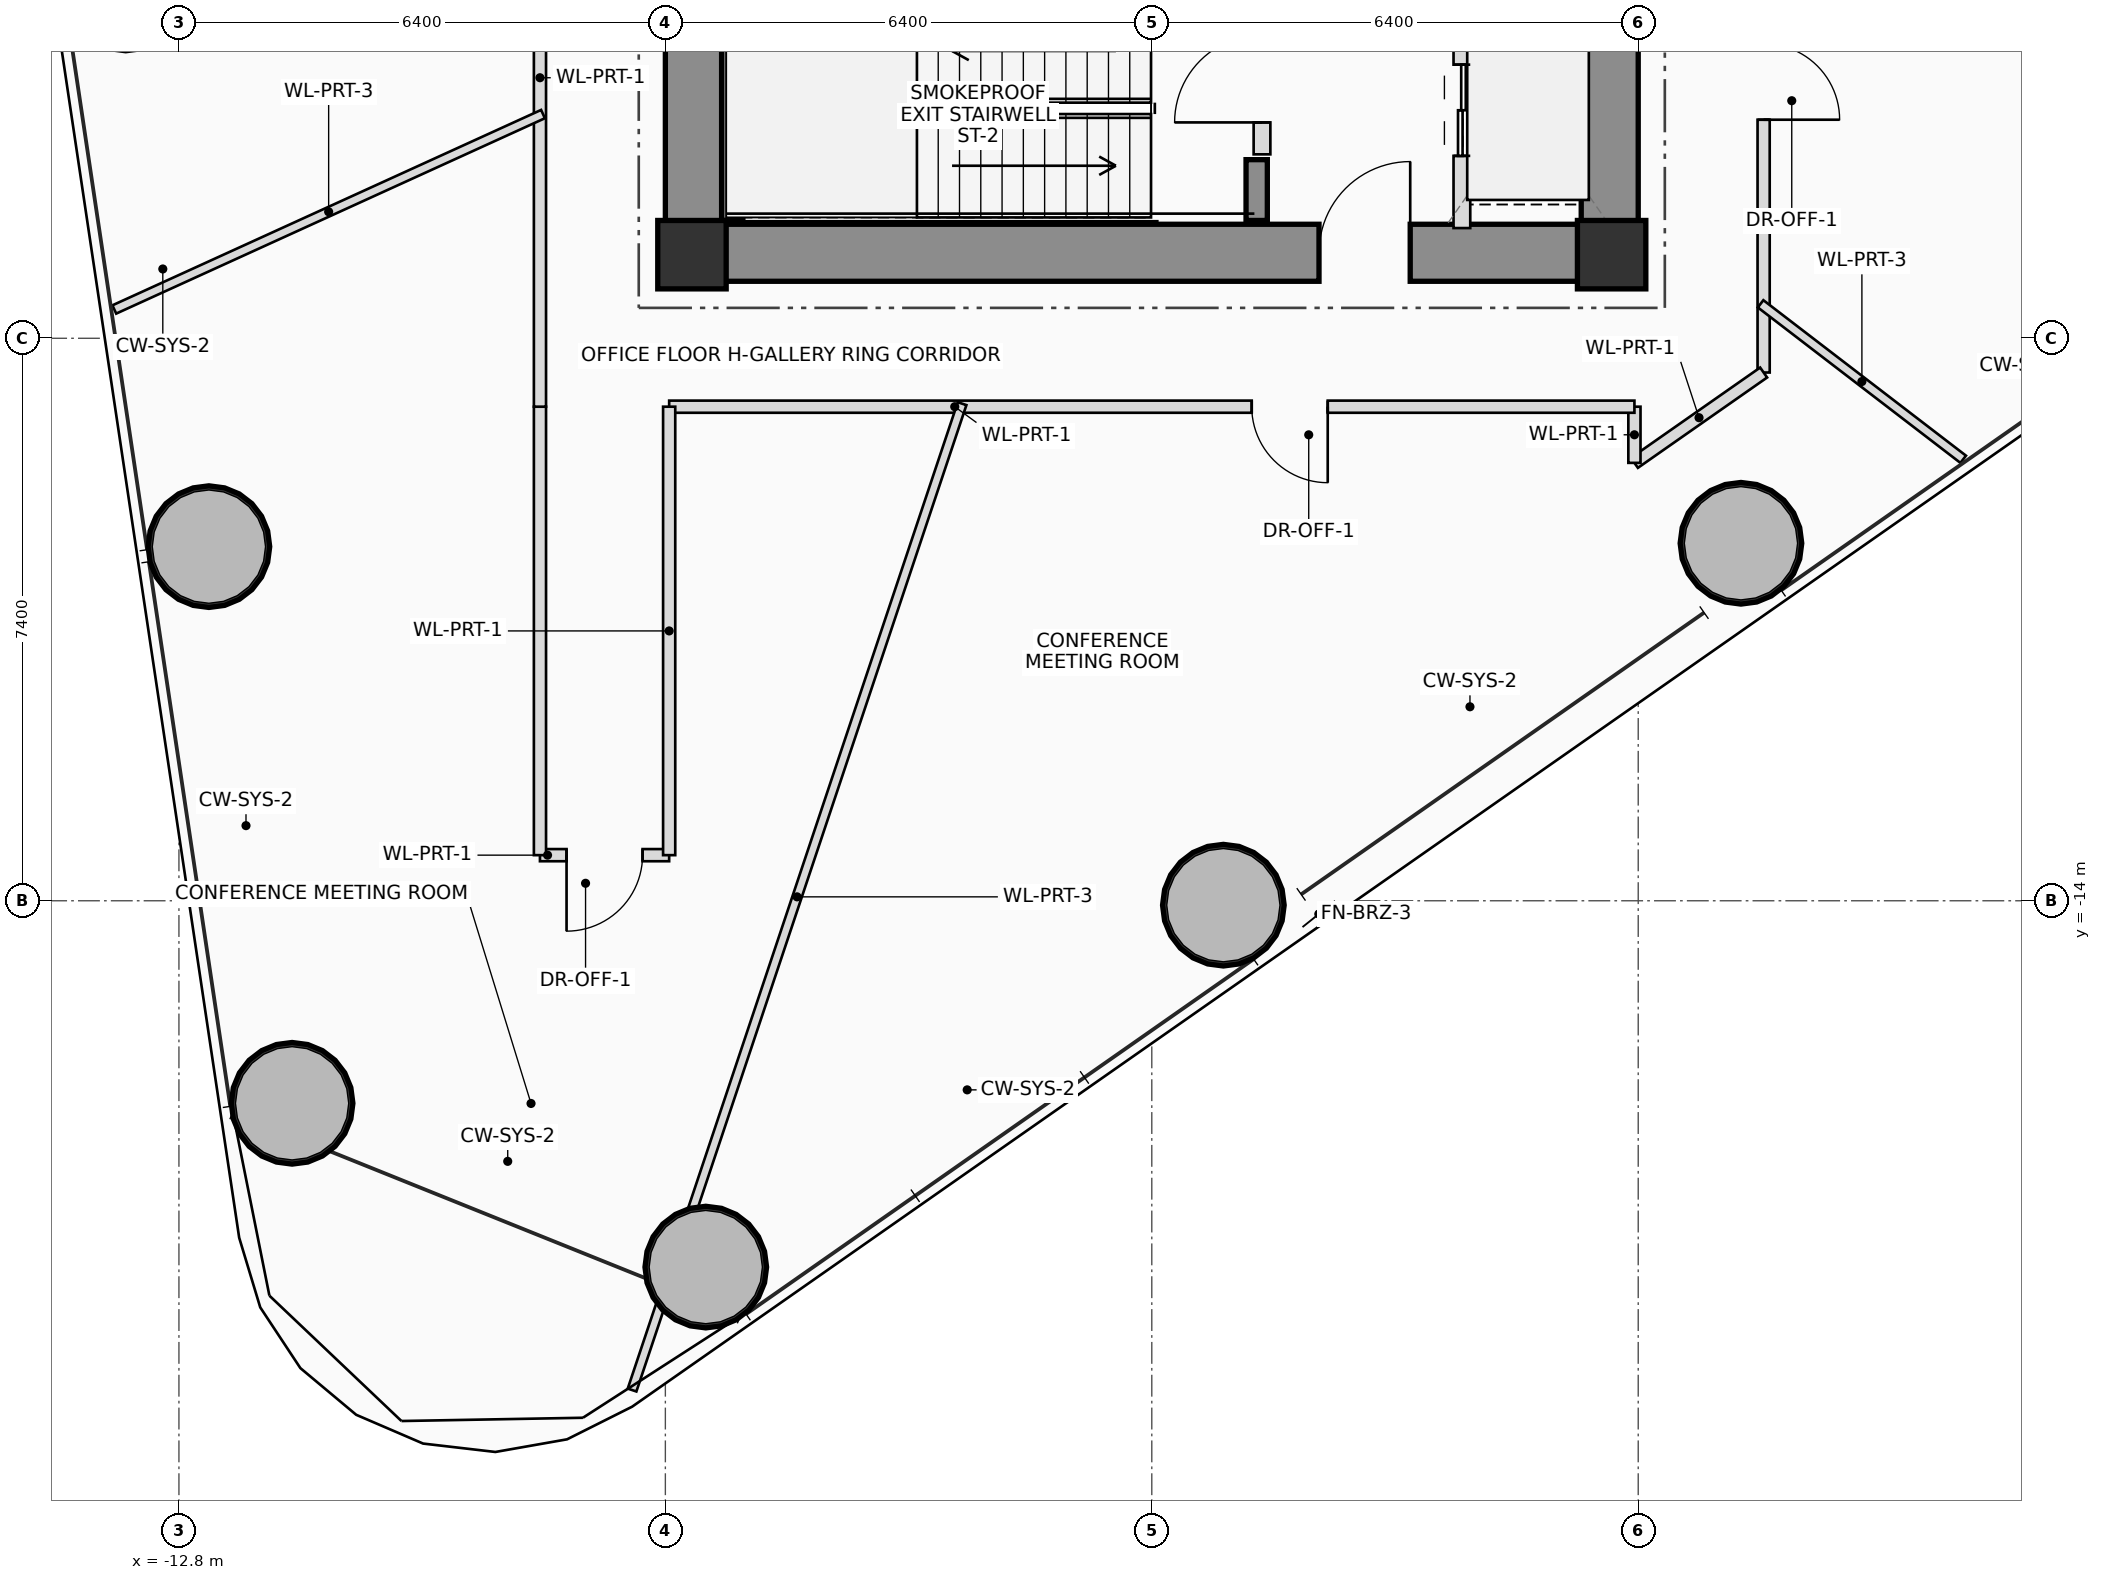
"""IFC4 building model, lengths in metres.
Left out: names, types, materials, properties, quantities, classifications, styles, units other than length and angle.
Written with IfcOpenShell. Run it as: python <this file> out.ifc"""

import sys

from ifc_helpers import new_model, si_unit, direction, frame, frame_2d, origin, origin_2d, place, context, subcontext, project, spatial, rectangle, hollow_circle, extrude, source, transform, mapped, element, fill, save


model = new_model("IFC4")
c1 = context("Model", 3, precision=1e-05, world=origin(), true_north=direction((0.0, 1.0)))
c2 = subcontext(c1, "Body", "Model", "MODEL_VIEW")
j1 = project(units=[si_unit("LENGTHUNIT", "METRE"), si_unit("PLANEANGLEUNIT", "RADIAN")], contexts=[c1])
p1 = place(None, origin())
s1 = spatial("IfcSite", under=j1, at=p1, CompositionType="ELEMENT")
p2 = place(p1, origin())
s2 = spatial("IfcBuilding", under=s1, at=p2, CompositionType="ELEMENT")
p3 = place(p2, frame((0.0, 0.0, 54.8)))
s3 = spatial("IfcBuildingStorey", under=s2, at=p3, CompositionType="ELEMENT", Elevation=54.8)
m1 = source(origin(), c2, "Body", "SweptSolid", [
    extrude(rectangle(XDim=0.9, YDim=0.9, at=origin_2d()), origin(), (0.0, 0.0, 1.0), 3.75),
])
for number, where, z_axis, x_axis in (
    (1, (-6.05, -5.5, 0.0), (0.0, 0.0, 1.0), (1.0, 0.0, 0.0)),
    (2, (6.05, -5.5, 0.0), (0.0, 0.0, 1.0), (1.0, 0.0, 0.0)),
):
    element("IfcColumn", number, at=place(p3, frame(where, z_axis=z_axis, x_axis=x_axis)), inside=s3, PredefinedType="COLUMN", context=c2, shape_type="MappedRepresentation", body=[
        mapped(m1, transform((0.0, 0.0, 0.0), scale=1.0)),
    ])
p4 = place(p3, frame((-6.4, -5.475, 0.0), z_axis=(0.0, 0.0, 1.0), x_axis=(1.0, 0.0, 0.0)))
e3 = element("IfcWall", 3, at=p4, inside=s3, PredefinedType="SHEAR", context=c2, shape_type="SweptSolid", body=[
    extrude(rectangle(XDim=12.8, YDim=0.75, at=frame_2d((6.4, 0.0))), origin(), (0.0, 0.0, 1.0), 3.75),
])
p5 = place(p4, frame((8.6, 0.0, 0.0)))
e4 = element("IfcOpeningElement", 4, at=p5, cuts=e3, PredefinedType="OPENING", context=c2, shape_type="SweptSolid", body=[
    extrude(rectangle(XDim=1.2, YDim=2.2, at=frame_2d((0.6, 1.1))), frame((0.0, 0.385, 0.0), z_axis=(0.0, -1.0, 0.0), x_axis=(1.0, 0.0, 0.0)), (0.0, 0.0, 1.0), 0.77),
])
p6 = place(p3, frame((6.025, -5.1, 0.0), z_axis=(0.0, 0.0, 1.0), x_axis=(0.0, 1.0, 0.0)))
e5 = element("IfcWall", 5, at=p6, inside=s3, PredefinedType="SHEAR", context=c2, shape_type="SweptSolid", body=[
    extrude(rectangle(XDim=10.2, YDim=0.75, at=frame_2d((5.1, 0.0))), origin(), (0.0, 0.0, 1.0), 3.75),
])
p7 = place(p3, frame((-6.025, -5.1, 0.0), z_axis=(0.0, 0.0, 1.0), x_axis=(0.0, 1.0, 0.0)))
e6 = element("IfcWall", 6, at=p7, inside=s3, PredefinedType="SHEAR", context=c2, shape_type="SweptSolid", body=[
    extrude(rectangle(XDim=3.35, YDim=0.75, at=frame_2d((1.675, 0.0))), origin(), (0.0, 0.0, 1.0), 3.75),
])
p8 = place(p3, frame((-5.52, -5.05, 0.0), z_axis=(0.0, 0.0, 1.0), x_axis=(0.0, 1.0, 0.0)))
e7 = element("IfcWall", 7, at=p8, inside=s3, PredefinedType="SHEAR", context=c2, shape_type="SweptSolid", body=[
    extrude(rectangle(XDim=2.75, YDim=0.28, at=frame_2d((1.375, 0.0))), origin(), (0.0, 0.0, 1.0), 3.75),
])
p9 = place(p3, frame((1.38, -5.05, 0.0), z_axis=(0.0, 0.0, 1.0), x_axis=(0.0, 1.0, 0.0)))
e8 = element("IfcWall", 8, at=p9, inside=s3, PredefinedType="SHEAR", context=c2, shape_type="SweptSolid", body=[
    extrude(rectangle(XDim=0.8, YDim=0.28, at=frame_2d((0.4, 0.0))), origin(), (0.0, 0.0, 1.0), 3.75),
])
m2 = source(origin(), c2, "Body", "SweptSolid", [
    extrude(hollow_circle(Radius=0.8, WallThickness=0.055, at=origin_2d()), origin(), (0.0, 0.0, 1.0), 3.75),
])
for number, where, z_axis, x_axis in (
    (9, (-5.868, -18.819, 0.0), (0.0, 0.0, 1.0), (1.0, 0.0, 0.0)),
    (10, (0.942, -14.058, 0.0), (0.0, 0.0, 1.0), (1.0, 0.0, 0.0)),
    (11, (7.752, -9.297, 0.0), (0.0, 0.0, 1.0), (1.0, 0.0, 0.0)),
    (12, (-12.406, -9.341, 0.0), (0.0, 0.0, 1.0), (1.0, 0.0, 0.0)),
    (13, (-11.311, -16.665, 0.0), (0.0, 0.0, 1.0), (1.0, 0.0, 0.0)),
):
    element("IfcColumn", number, at=place(p3, frame(where, z_axis=z_axis, x_axis=x_axis)), inside=s3, PredefinedType="COLUMN", context=c2, shape_type="MappedRepresentation", body=[
        mapped(m2, transform((0.0, 0.0, 0.0), scale=1.0)),
    ])
p10 = place(p3, frame((1.45, -4.18, 0.0), z_axis=(0.0, 0.0, 1.0), x_axis=(0.0, 1.0, 0.0)))
e14 = element("IfcWall", 14, at=p10, inside=s3, PredefinedType="PLUMBINGWALL", context=c2, shape_type="SweptSolid", body=[
    extrude(rectangle(XDim=1.98, YDim=0.22, at=frame_2d((0.99, 0.0))), origin(), (0.0, 0.0, 1.0), 3.545),
])
p11 = place(p10, frame((0.42, 0.0, 0.0)))
e15 = element("IfcOpeningElement", 15, at=p11, cuts=e14, PredefinedType="OPENING", context=c2, shape_type="SweptSolid", body=[
    extrude(rectangle(XDim=1.15, YDim=2.15, at=frame_2d((0.575, 1.075))), frame((0.0, 0.12, 0.0), z_axis=(0.0, -1.0, 0.0), x_axis=(1.0, 0.0, 0.0)), (0.0, 0.0, 1.0), 0.24),
])
p12 = place(p3, frame((4.08, -5.15, 0.0), z_axis=(0.0, 0.0, 1.0), x_axis=(0.0, 1.0, 0.0)))
e16 = element("IfcWall", 16, at=p12, inside=s3, PredefinedType="PLUMBINGWALL", context=c2, shape_type="SweptSolid", body=[
    extrude(rectangle(XDim=2.95, YDim=0.22, at=frame_2d((1.475, 0.0))), origin(), (0.0, 0.0, 1.0), 3.545),
])
p13 = place(p12, frame((0.95, 0.0, 0.0)))
e17 = element("IfcOpeningElement", 17, at=p13, cuts=e16, PredefinedType="OPENING", context=c2, shape_type="SweptSolid", body=[
    extrude(rectangle(XDim=1.2, YDim=2.25, at=frame_2d((0.6, 1.125))), frame((0.0, 0.12, 0.0), z_axis=(0.0, -1.0, 0.0), x_axis=(1.0, 0.0, 0.0)), (0.0, 0.0, 1.0), 0.24),
])
p14 = place(p3, frame((-6.35, -13.4, 0.0), z_axis=(0.0, 0.0, 1.0), x_axis=(-1.0, 0.0, 0.0)))
e18 = element("IfcWall", 18, at=p14, inside=s3, PredefinedType="PARTITIONING", context=c2, shape_type="SweptSolid", body=[
    extrude(rectangle(XDim=1.7, YDim=0.16, at=frame_2d((0.85, 0.0))), origin(), (0.0, 0.0, 1.0), 3.545),
])
p15 = place(p14, frame((0.35, 0.0, 0.0)))
e19 = element("IfcOpeningElement", 19, at=p15, cuts=e18, PredefinedType="OPENING", context=c2, shape_type="SweptSolid", body=[
    extrude(rectangle(XDim=1.0, YDim=2.25, at=frame_2d((0.5, 1.125))), frame((0.0, 0.09, 0.0), z_axis=(0.0, -1.0, 0.0), x_axis=(1.0, 0.0, 0.0)), (0.0, 0.0, 1.0), 0.18),
])
p16 = place(p3, frame((-8.05, -13.4, 0.0), z_axis=(0.0, 0.0, 1.0), x_axis=(0.0, 1.0, 0.0)))
e20 = element("IfcWall", 20, at=p16, inside=s3, PredefinedType="PARTITIONING", context=c2, shape_type="SweptSolid", body=[
    extrude(rectangle(XDim=5.9, YDim=0.16, at=frame_2d((2.95, 0.0))), origin(), (0.0, 0.0, 1.0), 2.85),
])
p17 = place(p3, frame((-8.05, -7.5, 0.0), z_axis=(0.0, 0.0, 1.0), x_axis=(0.0, 1.0, 0.0)))
e21 = element("IfcWall", 21, at=p17, inside=s3, PredefinedType="PARTITIONING", context=c2, shape_type="SweptSolid", body=[
    extrude(rectangle(XDim=15.0, YDim=0.16, at=frame_2d((7.5, 0.0))), origin(), (0.0, 0.0, 1.0), 2.85),
])
p18 = place(p17, frame((8.806, 0.0, 0.0)))
e22 = element("IfcOpeningElement", 22, at=p18, cuts=e21, PredefinedType="OPENING", context=c2, shape_type="SweptSolid", body=[
    extrude(rectangle(XDim=1.0, YDim=2.25, at=frame_2d((0.5, 1.125))), frame((0.0, 0.09, 0.0), z_axis=(0.0, -1.0, 0.0), x_axis=(1.0, 0.0, 0.0)), (0.0, 0.0, 1.0), 0.18),
])
p19 = place(p3, frame((8.05, -0.02, 0.0), z_axis=(0.0, 0.0, 1.0), x_axis=(0.0, -1.0, 0.0)))
e23 = element("IfcWall", 23, at=p19, inside=s3, PredefinedType="PARTITIONING", context=c2, shape_type="SweptSolid", body=[
    extrude(rectangle(XDim=7.03, YDim=0.16, at=frame_2d((3.515, 0.0))), origin(), (0.0, 0.0, 1.0), 2.85),
])
p20 = place(p19, frame((2.705, 0.0, 0.0)))
e24 = element("IfcOpeningElement", 24, at=p20, cuts=e23, PredefinedType="OPENING", context=c2, shape_type="SweptSolid", body=[
    extrude(rectangle(XDim=1.0, YDim=2.25, at=frame_2d((0.5, 1.125))), frame((0.0, 0.09, 0.0), z_axis=(0.0, -1.0, 0.0), x_axis=(1.0, 0.0, 0.0)), (0.0, 0.0, 1.0), 0.18),
])
p21 = place(p3, frame((8.05, -7.05, 0.0), z_axis=(0.0, 0.0, 1.0), x_axis=(-0.819513816746, -0.573059424635, 0.0)))
e25 = element("IfcWall", 25, at=p21, inside=s3, PredefinedType="PARTITIONING", context=c2, shape_type="SweptSolid", body=[
    extrude(rectangle(XDim=2.074, YDim=0.16, at=frame_2d((1.037, 0.0))), origin(), (0.0, 0.0, 1.0), 2.85),
])
p22 = place(p3, frame((6.35, -8.239, 0.0), z_axis=(0.0, 0.0, 1.0), x_axis=(0.0, 1.0, 0.0)))
e26 = element("IfcWall", 26, at=p22, inside=s3, PredefinedType="PARTITIONING", context=c2, shape_type="SweptSolid", body=[
    extrude(rectangle(XDim=0.739, YDim=0.16, at=frame_2d((0.37, 0.0))), origin(), (0.0, 0.0, 1.0), 3.545),
])
p23 = place(p3, frame((6.35, -7.5, 0.0), z_axis=(0.0, 0.0, 1.0), x_axis=(-1.0, 0.0, 0.0)))
e27 = element("IfcWall", 27, at=p23, inside=s3, PredefinedType="PARTITIONING", context=c2, shape_type="SweptSolid", body=[
    extrude(rectangle(XDim=12.7, YDim=0.16, at=frame_2d((6.35, 0.0))), origin(), (0.0, 0.0, 1.0), 2.85),
])
p24 = place(p23, frame((4.035, 0.0, 0.0)))
e28 = element("IfcOpeningElement", 28, at=p24, cuts=e27, PredefinedType="OPENING", context=c2, shape_type="SweptSolid", body=[
    extrude(rectangle(XDim=1.0, YDim=2.25, at=frame_2d((0.5, 1.125))), frame((0.0, 0.09, 0.0), z_axis=(0.0, -1.0, 0.0), x_axis=(1.0, 0.0, 0.0)), (0.0, 0.0, 1.0), 0.18),
])
p25 = place(p3, frame((-6.35, -7.5, 0.0), z_axis=(0.0, 0.0, 1.0), x_axis=(0.0, -1.0, 0.0)))
e29 = element("IfcWall", 29, at=p25, inside=s3, PredefinedType="PARTITIONING", context=c2, shape_type="SweptSolid", body=[
    extrude(rectangle(XDim=5.9, YDim=0.16, at=frame_2d((2.95, 0.0))), origin(), (0.0, 0.0, 1.0), 3.05),
])
p26 = place(p3, frame((-8.01, -3.65, 0.0), z_axis=(0.0, 0.0, 1.0), x_axis=(-0.909955974898, -0.414704863425, 0.0)))
e30 = element("IfcWall", 30, at=p26, inside=s3, PredefinedType="PARTITIONING", context=c2, shape_type="SweptSolid", body=[
    extrude(rectangle(XDim=6.198, YDim=0.12, at=frame_2d((3.099, 0.0))), origin(), (0.0, 0.0, 1.0), 2.85),
])
p27 = place(p3, frame((-2.496, -7.46, 0.0), z_axis=(0.0, 0.0, 1.0), x_axis=(-0.317303379034, -0.948324082608, 0.0)))
e31 = element("IfcWall", 31, at=p27, inside=s3, PredefinedType="PARTITIONING", context=c2, shape_type="SweptSolid", body=[
    extrude(rectangle(XDim=13.684, YDim=0.12, at=frame_2d((6.842, 0.0))), origin(), (0.0, 0.0, 1.0), 2.85),
])
p28 = place(p3, frame((8.01, -6.146, 0.0), z_axis=(0.0, 0.0, 1.0), x_axis=(0.79333380799, -0.608786883153, 0.0)))
e32 = element("IfcWall", 32, at=p28, inside=s3, PredefinedType="PARTITIONING", context=c2, shape_type="SweptSolid", body=[
    extrude(rectangle(XDim=3.36, YDim=0.12, at=frame_2d((1.68, 0.0))), origin(), (0.0, 0.0, 1.0), 3.01),
])
p29 = place(p5, origin())
e33 = element("IfcDoor", 33, at=p29, inside=s3, OperationType="SINGLE_SWING_RIGHT", PredefinedType="DOOR", context=c2, shape_type="SweptSolid", body=[
    extrude(rectangle(XDim=1.2, YDim=2.2, at=frame_2d((0.6, 1.1))), frame((0.0, 0.025, 0.0), z_axis=(0.0, -1.0, 0.0), x_axis=(1.0, 0.0, 0.0)), (0.0, 0.0, 1.0), 0.05),
])
fill(e4, e33)
p30 = place(p11, origin())
e34 = element("IfcDoor", 34, at=p30, inside=s3, OperationType="SINGLE_SWING_LEFT", PredefinedType="DOOR", context=c2, shape_type="SweptSolid", body=[
    extrude(rectangle(XDim=1.15, YDim=2.15, at=frame_2d((0.575, 1.075))), frame((0.0, 0.025, 0.0), z_axis=(0.0, -1.0, 0.0), x_axis=(1.0, 0.0, 0.0)), (0.0, 0.0, 1.0), 0.05),
])
fill(e15, e34)
p31 = place(p13, origin())
e35 = element("IfcDoor", 35, at=p31, inside=s3, OperationType="DOUBLE_DOOR_SLIDING", PredefinedType="DOOR", context=c2, shape_type="SweptSolid", body=[
    extrude(rectangle(XDim=1.2, YDim=2.25, at=frame_2d((0.6, 1.125))), frame((0.0, 0.025, 0.0), z_axis=(0.0, -1.0, 0.0), x_axis=(1.0, 0.0, 0.0)), (0.0, 0.0, 1.0), 0.05),
])
fill(e17, e35)
p32 = place(p15, origin())
e36 = element("IfcDoor", 36, at=p32, inside=s3, OperationType="SINGLE_SWING_RIGHT", PredefinedType="DOOR", context=c2, shape_type="SweptSolid", body=[
    extrude(rectangle(XDim=1.0, YDim=2.25, at=frame_2d((0.5, 1.125))), frame((0.0, 0.025, 0.0), z_axis=(0.0, -1.0, 0.0), x_axis=(1.0, 0.0, 0.0)), (0.0, 0.0, 1.0), 0.05),
])
fill(e19, e36)
p33 = place(p20, origin())
e37 = element("IfcDoor", 37, at=p33, inside=s3, OperationType="SINGLE_SWING_RIGHT", PredefinedType="DOOR", context=c2, shape_type="SweptSolid", body=[
    extrude(rectangle(XDim=1.0, YDim=2.25, at=frame_2d((0.5, 1.125))), frame((0.0, 0.025, 0.0), z_axis=(0.0, -1.0, 0.0), x_axis=(1.0, 0.0, 0.0)), (0.0, 0.0, 1.0), 0.05),
])
fill(e24, e37)
p34 = place(p24, origin())
e38 = element("IfcDoor", 38, at=p34, inside=s3, OperationType="SINGLE_SWING_LEFT", PredefinedType="DOOR", context=c2, shape_type="SweptSolid", body=[
    extrude(rectangle(XDim=1.0, YDim=2.25, at=frame_2d((0.5, 1.125))), frame((0.0, 0.025, 0.0), z_axis=(0.0, -1.0, 0.0), x_axis=(1.0, 0.0, 0.0)), (0.0, 0.0, 1.0), 0.05),
])
fill(e28, e38)
save(model, sys.argv[1])
